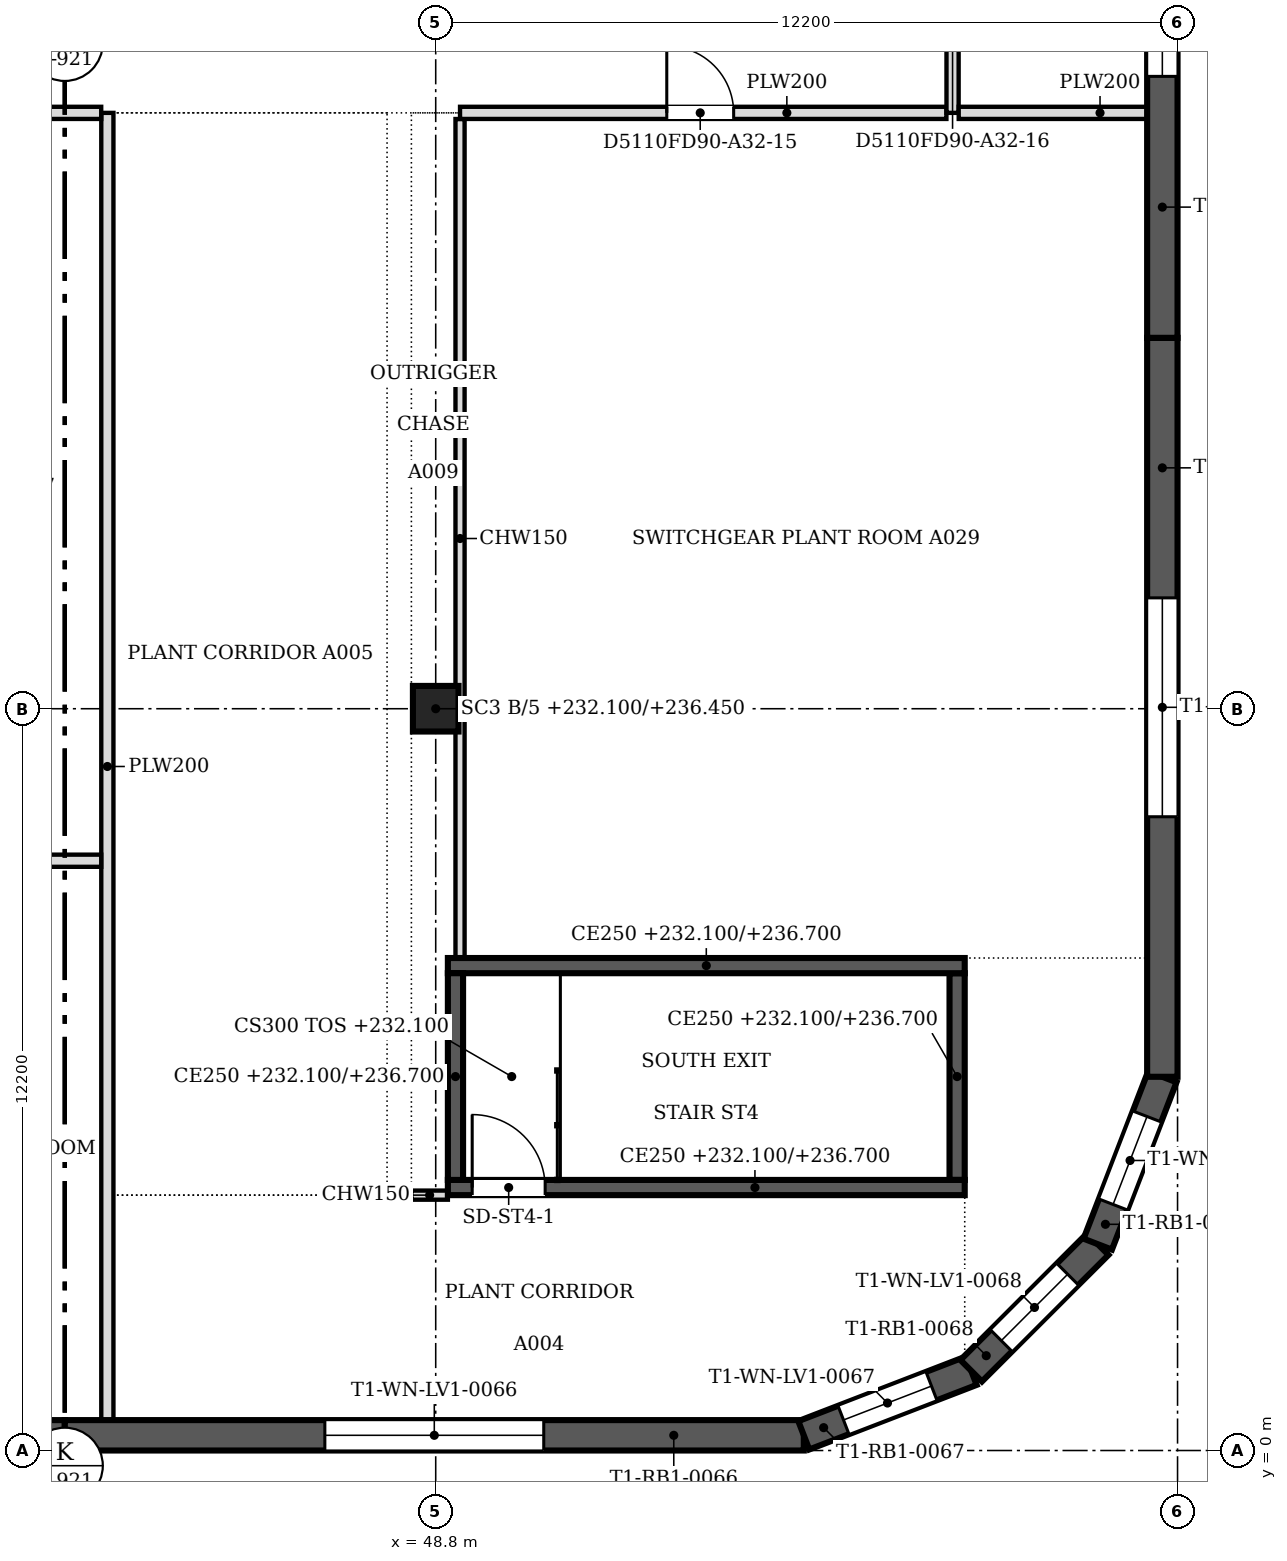
"""IFC4 building model, lengths in metres.
Left out: names, types, materials, properties, quantities, classifications, styles, units other than length and angle.
Written with IfcOpenShell. Run it as: python <this file> out.ifc"""

import sys

from ifc_helpers import new_model, si_unit, direction, frame, frame_2d, origin, origin_2d, place, context, subcontext, project, spatial, polyline, rectangle, outline, extrude, faceted_brep, source, transform, mapped, element, fill, save


model = new_model("IFC4")
c1 = context("Model", 3, precision=1e-05, world=origin(), true_north=direction((0.0, 1.0)))
c2 = subcontext(c1, "Body", "Model", "MODEL_VIEW")
j1 = project(units=[si_unit("LENGTHUNIT", "METRE"), si_unit("PLANEANGLEUNIT", "RADIAN")], contexts=[c1])
p1 = place(None, origin())
s1 = spatial("IfcSite", under=j1, at=p1, CompositionType="ELEMENT")
p2 = place(p1, origin())
s2 = spatial("IfcBuilding", under=s1, at=p2, CompositionType="ELEMENT")
p3 = place(p2, frame((0.0, 0.0, 232.1)))
s3 = spatial("IfcBuildingStorey", under=s2, at=p3, CompositionType="ELEMENT", Elevation=232.1)
p4 = place(p3, frame((48.8, 12.2, 0.0), z_axis=(0.0, 0.0, 1.0), x_axis=(1.0, 0.0, 0.0)))
e1 = element("IfcColumn", 1, at=p4, inside=s3, PredefinedType="COLUMN", context=c2, shape_type="SweptSolid", body=[
    extrude(rectangle(XDim=0.75, YDim=0.75, at=origin_2d()), origin(), (0.0, 0.0, 1.0), 4.35),
])
m1 = source(origin(), c2, "Body", "Brep", [
    faceted_brep([(0.0, -0.25, 0.0), (12.154, -0.25, 0.0), (12.154, -0.25, 4.8), (0.0, -0.25, 4.8), (0.047, 0.25, 4.8), (12.154, 0.25, 4.8), (12.154, 0.25, 0.0), (0.047, 0.25, 0.0), (0.0, 0.0, 0.0), (0.0, 0.0, 4.8)], [[[0, 1, 2, 3]], [[4, 5, 6, 7]], [[7, 6, 1, 0, 8]], [[5, 4, 9, 3, 2]], [[8, 0, 3, 9]], [[7, 8, 9, 4]], [[1, 6, 5, 2]]]),
])
p5 = place(p3, frame((30.547, 0.25, 0.0), z_axis=(0.0, 0.0, 1.0), x_axis=(1.0, 0.0, 0.0)))
e2 = element("IfcWall", 2, at=p5, inside=s3, PredefinedType="SOLIDWALL", context=c2, shape_type="MappedRepresentation", body=[
    mapped(m1, transform((0.0, 0.0, 0.0), scale=1.0)),
])
m2 = source(origin(), c2, "Body", "SweptSolid", [
    extrude(outline(polyline([(4.277, 0.8), (7.877, 0.8), (7.877, 4.0), (4.277, 4.0), (4.277, 0.8)])), frame((0.0, 0.26, 0.0), z_axis=(0.0, -1.0, 0.0), x_axis=(1.0, 0.0, 0.0)), (0.0, 0.0, 1.0), 0.52),
])
p6 = place(p5, origin())
e3 = element("IfcOpeningElement", 3, at=p6, cuts=e2, PredefinedType="OPENING", context=c2, shape_type="MappedRepresentation", body=[
    mapped(m2, transform((0.0, 0.0, 0.0), scale=1.0)),
])
m3 = source(origin(), c2, "Body", "Brep", [
    faceted_brep([(0.0, -0.25, 0.0), (12.154, -0.25, 0.0), (12.154, -0.25, 4.8), (0.0, -0.25, 4.8), (0.0, 0.25, 4.8), (12.107, 0.25, 4.8), (12.107, 0.25, 0.0), (0.0, 0.25, 0.0), (12.154, -0.0, 0.0), (12.154, -0.0, 4.8)], [[[0, 1, 2, 3]], [[4, 5, 6, 7]], [[7, 6, 8, 1, 0]], [[9, 2, 1, 8]], [[5, 4, 3, 2, 9]], [[4, 7, 0, 3]], [[8, 6, 5, 9]]]),
])
p7 = place(p3, frame((42.7, 0.25, 0.0), z_axis=(0.0, 0.0, 1.0), x_axis=(1.0, 0.0, 0.0)))
e4 = element("IfcWall", 4, at=p7, inside=s3, PredefinedType="SOLIDWALL", context=c2, shape_type="MappedRepresentation", body=[
    mapped(m3, transform((0.0, 0.0, 0.0), scale=1.0)),
])
p8 = place(p7, origin())
e5 = element("IfcOpeningElement", 5, at=p8, cuts=e4, PredefinedType="OPENING", context=c2, shape_type="MappedRepresentation", body=[
    mapped(m2, transform((0.0, 0.0, 0.0), scale=1.0)),
])
m4 = source(origin(), c2, "Body", "Brep", [
    faceted_brep([(0.0, -0.25, 0.0), (2.95, -0.25, 0.0), (2.95, -0.25, 4.8), (0.0, -0.25, 4.8), (0.047, 0.25, 4.8), (2.898, 0.25, 4.8), (2.898, 0.25, 0.0), (0.047, 0.25, 0.0), (2.95, 0.0, 0.0), (0.0, 0.0, 0.0), (2.95, 0.0, 4.8), (0.0, 0.0, 4.8)], [[[0, 1, 2, 3]], [[4, 5, 6, 7]], [[7, 6, 8, 1, 0, 9]], [[10, 2, 1, 8]], [[5, 4, 11, 3, 2, 10]], [[9, 0, 3, 11]], [[7, 9, 11, 4]], [[8, 6, 5, 10]]]),
])
p9 = place(p3, frame((54.854, 0.25, 0.0), z_axis=(0.0, 0.0, 1.0), x_axis=(0.932999673775, 0.359877213415, 0.0)))
e6 = element("IfcWall", 6, at=p9, inside=s3, PredefinedType="SOLIDWALL", context=c2, shape_type="MappedRepresentation", body=[
    mapped(m4, transform((0.0, 0.0, 0.0), scale=1.0)),
])
m5 = source(origin(), c2, "Body", "SweptSolid", [
    extrude(outline(polyline([(0.7, 0.8), (2.25, 0.8), (2.25, 4.0), (0.7, 4.0), (0.7, 0.8)])), frame((0.0, 0.26, 0.0), z_axis=(0.0, -1.0, 0.0), x_axis=(1.0, 0.0, 0.0)), (0.0, 0.0, 1.0), 0.52),
])
p10 = place(p9, origin())
e7 = element("IfcOpeningElement", 7, at=p10, cuts=e6, PredefinedType="OPENING", context=c2, shape_type="MappedRepresentation", body=[
    mapped(m5, transform((0.0, 0.0, 0.0), scale=1.0)),
])
m6 = source(origin(), c2, "Body", "Brep", [
    faceted_brep([(0.0, -0.25, 0.0), (2.944, -0.25, 0.0), (2.944, -0.25, 4.8), (0.0, -0.25, 4.8), (0.053, 0.25, 4.8), (2.891, 0.25, 4.8), (2.891, 0.25, 0.0), (0.053, 0.25, 0.0), (2.944, 0.0, 0.0), (0.0, 0.0, 0.0), (2.944, 0.0, 4.8), (0.0, 0.0, 4.8)], [[[0, 1, 2, 3]], [[4, 5, 6, 7]], [[7, 6, 8, 1, 0, 9]], [[10, 2, 1, 8]], [[5, 4, 11, 3, 2, 10]], [[9, 0, 3, 11]], [[7, 9, 11, 4]], [[8, 6, 5, 10]]]),
])
p11 = place(p3, frame((57.606, 1.312, 0.0), z_axis=(0.0, 0.0, 1.0), x_axis=(0.707106781187, 0.707106781187, 0.0)))
e8 = element("IfcWall", 8, at=p11, inside=s3, PredefinedType="SOLIDWALL", context=c2, shape_type="MappedRepresentation", body=[
    mapped(m6, transform((0.0, 0.0, 0.0), scale=1.0)),
])
m7 = source(origin(), c2, "Body", "SweptSolid", [
    extrude(outline(polyline([(0.7, 0.8), (2.244, 0.8), (2.244, 4.0), (0.7, 4.0), (0.7, 0.8)])), frame((0.0, 0.26, 0.0), z_axis=(0.0, -1.0, 0.0), x_axis=(1.0, 0.0, 0.0)), (0.0, 0.0, 1.0), 0.52),
])
p12 = place(p11, origin())
e9 = element("IfcOpeningElement", 9, at=p12, cuts=e8, PredefinedType="OPENING", context=c2, shape_type="MappedRepresentation", body=[
    mapped(m7, transform((0.0, 0.0, 0.0), scale=1.0)),
])
m8 = source(origin(), c2, "Body", "Brep", [
    faceted_brep([(0.0, -0.25, 0.0), (2.95, -0.25, 0.0), (2.95, -0.25, 4.8), (0.0, -0.25, 4.8), (0.053, 0.25, 4.8), (2.904, 0.25, 4.8), (2.904, 0.25, 0.0), (0.053, 0.25, 0.0), (2.95, 0.0, 0.0), (0.0, 0.0, 0.0), (2.95, 0.0, 4.8), (0.0, 0.0, 4.8)], [[[0, 1, 2, 3]], [[4, 5, 6, 7]], [[7, 6, 8, 1, 0, 9]], [[10, 2, 1, 8]], [[5, 4, 11, 3, 2, 10]], [[9, 0, 3, 11]], [[7, 9, 11, 4]], [[8, 6, 5, 10]]]),
])
p13 = place(p3, frame((59.688, 3.394, 0.0), z_axis=(0.0, 0.0, 1.0), x_axis=(0.359949242603, 0.932971887438, 0.0)))
e10 = element("IfcWall", 10, at=p13, inside=s3, PredefinedType="SOLIDWALL", context=c2, shape_type="MappedRepresentation", body=[
    mapped(m8, transform((0.0, 0.0, 0.0), scale=1.0)),
])
p14 = place(p13, origin())
e11 = element("IfcOpeningElement", 11, at=p14, cuts=e10, PredefinedType="OPENING", context=c2, shape_type="MappedRepresentation", body=[
    mapped(m5, transform((0.0, 0.0, 0.0), scale=1.0)),
])
p15 = place(p3, frame((60.75, 6.146, 0.0), z_axis=(0.0, 0.0, 1.0), x_axis=(0.0, 1.0, 0.0)))
e12 = element("IfcWall", 12, at=p15, inside=s3, PredefinedType="SOLIDWALL", context=c2, shape_type="MappedRepresentation", body=[
    mapped(m1, transform((0.0, 0.0, 0.0), scale=1.0)),
])
p16 = place(p15, origin())
e13 = element("IfcOpeningElement", 13, at=p16, cuts=e12, PredefinedType="OPENING", context=c2, shape_type="MappedRepresentation", body=[
    mapped(m2, transform((0.0, 0.0, 0.0), scale=1.0)),
])
m9 = source(origin(), c2, "Body", "SweptSolid", [
    extrude(outline(polyline([(0.0, 0.0), (12.2, 0.0), (12.2, 4.8), (0.0, 4.8), (0.0, 0.0)])), frame((0.0, 0.25, 0.0), z_axis=(0.0, -1.0, 0.0), x_axis=(1.0, 0.0, 0.0)), (0.0, 0.0, 1.0), 0.5),
])
p17 = place(p3, frame((60.75, 18.3, 0.0), z_axis=(0.0, 0.0, 1.0), x_axis=(0.0, 1.0, 0.0)))
e14 = element("IfcWall", 14, at=p17, inside=s3, PredefinedType="SOLIDWALL", context=c2, shape_type="MappedRepresentation", body=[
    mapped(m9, transform((0.0, 0.0, 0.0), scale=1.0)),
])
m10 = source(origin(), c2, "Body", "SweptSolid", [
    extrude(outline(polyline([(4.3, 0.8), (7.9, 0.8), (7.9, 4.0), (4.3, 4.0), (4.3, 0.8)])), frame((0.0, 0.26, 0.0), z_axis=(0.0, -1.0, 0.0), x_axis=(1.0, 0.0, 0.0)), (0.0, 0.0, 1.0), 0.52),
])
p18 = place(p17, origin())
e15 = element("IfcOpeningElement", 15, at=p18, cuts=e14, PredefinedType="OPENING", context=c2, shape_type="MappedRepresentation", body=[
    mapped(m10, transform((0.0, 0.0, 0.0), scale=1.0)),
])
p19 = place(p3, frame((57.5, 4.325, 0.0), z_axis=(0.0, 0.0, 1.0), x_axis=(-1.0, 0.0, 0.0)))
e16 = element("IfcWall", 16, at=p19, inside=s3, PredefinedType="SOLIDWALL", context=c2, shape_type="SweptSolid", body=[
    extrude(rectangle(XDim=8.5, YDim=0.25, at=frame_2d((4.25, 0.0))), origin(), (0.0, 0.0, 1.0), 4.6),
])
m11 = source(origin(), c2, "Body", "SweptSolid", [
    extrude(rectangle(XDim=1.2, YDim=2.1, at=frame_2d((0.6, 1.05))), frame((0.0, 0.135, 0.0), z_axis=(0.0, -1.0, 0.0), x_axis=(1.0, 0.0, 0.0)), (0.0, 0.0, 1.0), 0.27),
])
p20 = place(p19, frame((6.9, 0.0, 0.0)))
e17 = element("IfcOpeningElement", 17, at=p20, cuts=e16, PredefinedType="OPENING", context=c2, shape_type="MappedRepresentation", body=[
    mapped(m11, transform((0.0, 0.0, 0.0), scale=1.0)),
])
p21 = place(p3, frame((49.125, 4.45, 0.0), z_axis=(0.0, 0.0, 1.0), x_axis=(0.0, 1.0, 0.0)))
e18 = element("IfcWall", 18, at=p21, inside=s3, PredefinedType="SOLIDWALL", context=c2, shape_type="SweptSolid", body=[
    extrude(rectangle(XDim=3.4, YDim=0.25, at=frame_2d((1.7, 0.0))), origin(), (0.0, 0.0, 1.0), 4.6),
])
p22 = place(p3, frame((49.0, 7.975, 0.0), z_axis=(0.0, 0.0, 1.0), x_axis=(1.0, 0.0, 0.0)))
e19 = element("IfcWall", 19, at=p22, inside=s3, PredefinedType="SOLIDWALL", context=c2, shape_type="SweptSolid", body=[
    extrude(rectangle(XDim=8.5, YDim=0.25, at=frame_2d((4.25, 0.0))), origin(), (0.0, 0.0, 1.0), 4.6),
])
p23 = place(p3, frame((57.375, 7.85, 0.0), z_axis=(0.0, 0.0, 1.0), x_axis=(0.0, -1.0, 0.0)))
e20 = element("IfcWall", 20, at=p23, inside=s3, PredefinedType="SOLIDWALL", context=c2, shape_type="SweptSolid", body=[
    extrude(rectangle(XDim=3.4, YDim=0.25, at=frame_2d((1.7, 0.0))), origin(), (0.0, 0.0, 1.0), 4.6),
])
p24 = place(p3, frame((43.4, 0.5, 0.0), z_axis=(0.0, 0.0, 1.0), x_axis=(0.0, 1.0, 0.0)))
e21 = element("IfcWall", 21, at=p24, inside=s3, PredefinedType="PARTITIONING", context=c2, shape_type="SweptSolid", body=[
    extrude(rectangle(XDim=21.5, YDim=0.2, at=frame_2d((10.75, 0.0))), origin(), (0.0, 0.0, 1.0), 3.817),
])
p25 = place(p3, frame((48.4, 4.2, 0.0), z_axis=(0.0, 0.0, 1.0), x_axis=(1.0, 0.0, 0.0)))
e22 = element("IfcWall", 22, at=p25, inside=s3, PredefinedType="PARTITIONING", context=c2, shape_type="SweptSolid", body=[
    extrude(rectangle(XDim=0.6, YDim=0.15, at=frame_2d((0.3, 0.0))), origin(), (0.0, 0.0, 1.0), 3.817),
])
p26 = place(p3, frame((49.2, 8.1, 0.0), z_axis=(0.0, 0.0, 1.0), x_axis=(0.0, 1.0, 0.0)))
e23 = element("IfcWall", 23, at=p26, inside=s3, PredefinedType="PARTITIONING", context=c2, shape_type="SweptSolid", body=[
    extrude(rectangle(XDim=13.799, YDim=0.15, at=frame_2d((6.899, 0.0))), origin(), (0.0, 0.0, 1.0), 3.817),
])
p27 = place(p3, frame((43.299, 9.7, 0.0), z_axis=(0.0, 0.0, 1.0), x_axis=(-1.0, 0.0, 0.0)))
e24 = element("IfcWall", 24, at=p27, inside=s3, PredefinedType="PARTITIONING", context=c2, shape_type="SweptSolid", body=[
    extrude(rectangle(XDim=6.299, YDim=0.2, at=frame_2d((3.149, 0.0))), origin(), (0.0, 0.0, 1.0), 3.817),
])
m12 = source(origin(), c2, "Body", "SweptSolid", [
    extrude(rectangle(XDim=1.1, YDim=2.1, at=frame_2d((0.55, 1.05))), frame((0.0, 0.11, 0.0), z_axis=(0.0, -1.0, 0.0), x_axis=(1.0, 0.0, 0.0)), (0.0, 0.0, 1.0), 0.22),
])
p28 = place(p27, frame((2.599, 0.0, 0.0)))
e25 = element("IfcOpeningElement", 25, at=p28, cuts=e24, PredefinedType="OPENING", context=c2, shape_type="MappedRepresentation", body=[
    mapped(m12, transform((0.0, 0.0, 0.0), scale=1.0)),
])
p29 = place(p3, frame((43.299, 22.0, 0.0), z_axis=(0.0, 0.0, 1.0), x_axis=(-1.0, 0.0, 0.0)))
e26 = element("IfcWall", 26, at=p29, inside=s3, PredefinedType="PARTITIONING", context=c2, shape_type="SweptSolid", body=[
    extrude(rectangle(XDim=6.299, YDim=0.2, at=frame_2d((3.149, 0.0))), origin(), (0.0, 0.0, 1.0), 3.817),
])
p30 = place(p29, frame((2.599, 0.0, 0.0)))
e27 = element("IfcOpeningElement", 27, at=p30, cuts=e26, PredefinedType="OPENING", context=c2, shape_type="MappedRepresentation", body=[
    mapped(m12, transform((0.0, 0.0, 0.0), scale=1.0)),
])
p31 = place(p3, frame((57.199, 22.0, 0.0), z_axis=(0.0, 0.0, 1.0), x_axis=(-1.0, 0.0, 0.0)))
e28 = element("IfcWall", 28, at=p31, inside=s3, PredefinedType="PARTITIONING", context=c2, shape_type="SweptSolid", body=[
    extrude(rectangle(XDim=7.999, YDim=0.2, at=frame_2d((4.0, 0.0))), origin(), (0.0, 0.0, 1.0), 3.817),
])
p32 = place(p31, frame((3.499, 0.0, 0.0)))
e29 = element("IfcOpeningElement", 29, at=p32, cuts=e28, PredefinedType="OPENING", context=c2, shape_type="MappedRepresentation", body=[
    mapped(m12, transform((0.0, 0.0, 0.0), scale=1.0)),
])
p33 = place(p3, frame((57.3, 30.6, 0.0), z_axis=(0.0, 0.0, 1.0), x_axis=(0.0, -1.0, 0.0)))
e30 = element("IfcWall", 30, at=p33, inside=s3, PredefinedType="PARTITIONING", context=c2, shape_type="SweptSolid", body=[
    extrude(rectangle(XDim=8.6, YDim=0.2, at=frame_2d((4.3, 0.0))), origin(), (0.0, 0.0, 1.0), 3.817),
])
p34 = place(p33, frame((3.8, 0.0, 0.0)))
e31 = element("IfcOpeningElement", 31, at=p34, cuts=e30, PredefinedType="OPENING", context=c2, shape_type="MappedRepresentation", body=[
    mapped(m12, transform((0.0, 0.0, 0.0), scale=1.0)),
])
p35 = place(p3, frame((57.401, 22.0, 0.0), z_axis=(0.0, 0.0, 1.0), x_axis=(1.0, 0.0, 0.0)))
e32 = element("IfcWall", 32, at=p35, inside=s3, PredefinedType="PARTITIONING", context=c2, shape_type="SweptSolid", body=[
    extrude(rectangle(XDim=3.099, YDim=0.2, at=frame_2d((1.55, 0.0))), origin(), (0.0, 0.0, 1.0), 3.817),
])
m13 = source(origin(), c2, "Body", "SweptSolid", [
    extrude(outline(polyline([(4.277, 0.8), (7.877, 0.8), (7.877, 4.0), (4.277, 4.0), (4.277, 0.8)])), frame((0.0, 0.03, 0.0), z_axis=(0.0, -1.0, 0.0), x_axis=(1.0, 0.0, 0.0)), (0.0, 0.0, 1.0), 0.06),
])
p36 = place(p8, origin())
e33 = element("IfcWindow", 33, at=p36, inside=s3, PartitioningType="USERDEFINED", PredefinedType="WINDOW", context=c2, shape_type="MappedRepresentation", body=[
    mapped(m13, transform((0.0, 0.0, 0.0), scale=1.0)),
])
fill(e5, e33)
m14 = source(origin(), c2, "Body", "SweptSolid", [
    extrude(outline(polyline([(0.7, 0.8), (2.25, 0.8), (2.25, 4.0), (0.7, 4.0), (0.7, 0.8)])), frame((0.0, 0.03, 0.0), z_axis=(0.0, -1.0, 0.0), x_axis=(1.0, 0.0, 0.0)), (0.0, 0.0, 1.0), 0.06),
])
p37 = place(p10, origin())
e34 = element("IfcWindow", 34, at=p37, inside=s3, PartitioningType="USERDEFINED", PredefinedType="WINDOW", context=c2, shape_type="MappedRepresentation", body=[
    mapped(m14, transform((0.0, 0.0, 0.0), scale=1.0)),
])
fill(e7, e34)
m15 = source(origin(), c2, "Body", "SweptSolid", [
    extrude(outline(polyline([(0.7, 0.8), (2.244, 0.8), (2.244, 4.0), (0.7, 4.0), (0.7, 0.8)])), frame((0.0, 0.03, 0.0), z_axis=(0.0, -1.0, 0.0), x_axis=(1.0, 0.0, 0.0)), (0.0, 0.0, 1.0), 0.06),
])
p38 = place(p12, origin())
e35 = element("IfcWindow", 35, at=p38, inside=s3, PartitioningType="USERDEFINED", PredefinedType="WINDOW", context=c2, shape_type="MappedRepresentation", body=[
    mapped(m15, transform((0.0, 0.0, 0.0), scale=1.0)),
])
fill(e9, e35)
p39 = place(p14, origin())
e36 = element("IfcWindow", 36, at=p39, inside=s3, PartitioningType="USERDEFINED", PredefinedType="WINDOW", context=c2, shape_type="MappedRepresentation", body=[
    mapped(m14, transform((0.0, 0.0, 0.0), scale=1.0)),
])
fill(e11, e36)
p40 = place(p16, origin())
e37 = element("IfcWindow", 37, at=p40, inside=s3, PartitioningType="USERDEFINED", PredefinedType="WINDOW", context=c2, shape_type="MappedRepresentation", body=[
    mapped(m13, transform((0.0, 0.0, 0.0), scale=1.0)),
])
fill(e13, e37)
m16 = source(origin(), c2, "Body", "SweptSolid", [
    extrude(outline(polyline([(4.3, 0.8), (7.9, 0.8), (7.9, 4.0), (4.3, 4.0), (4.3, 0.8)])), frame((0.0, 0.03, 0.0), z_axis=(0.0, -1.0, 0.0), x_axis=(1.0, 0.0, 0.0)), (0.0, 0.0, 1.0), 0.06),
])
p41 = place(p18, origin())
e38 = element("IfcWindow", 38, at=p41, inside=s3, PartitioningType="USERDEFINED", PredefinedType="WINDOW", context=c2, shape_type="MappedRepresentation", body=[
    mapped(m16, transform((0.0, 0.0, 0.0), scale=1.0)),
])
fill(e15, e38)
m17 = source(origin(), c2, "Body", "SweptSolid", [
    extrude(rectangle(XDim=1.2, YDim=2.1, at=frame_2d((0.6, 1.05))), frame((0.0, 0.025, 0.0), z_axis=(0.0, -1.0, 0.0), x_axis=(1.0, 0.0, 0.0)), (0.0, 0.0, 1.0), 0.05),
])
p42 = place(p20, origin())
e39 = element("IfcDoor", 39, at=p42, inside=s3, OperationType="SINGLE_SWING_RIGHT", PredefinedType="DOOR", context=c2, shape_type="MappedRepresentation", body=[
    mapped(m17, transform((0.0, 0.0, 0.0), scale=1.0)),
])
fill(e17, e39)
m18 = source(origin(), c2, "Body", "SweptSolid", [
    extrude(rectangle(XDim=1.1, YDim=2.1, at=frame_2d((0.55, 1.05))), frame((0.0, 0.025, 0.0), z_axis=(0.0, -1.0, 0.0), x_axis=(1.0, 0.0, 0.0)), (0.0, 0.0, 1.0), 0.05),
])
p43 = place(p32, origin())
e40 = element("IfcDoor", 40, at=p43, inside=s3, OperationType="SINGLE_SWING_RIGHT", PredefinedType="DOOR", context=c2, shape_type="MappedRepresentation", body=[
    mapped(m18, transform((0.0, 0.0, 0.0), scale=1.0)),
])
fill(e29, e40)
save(model, sys.argv[1])
